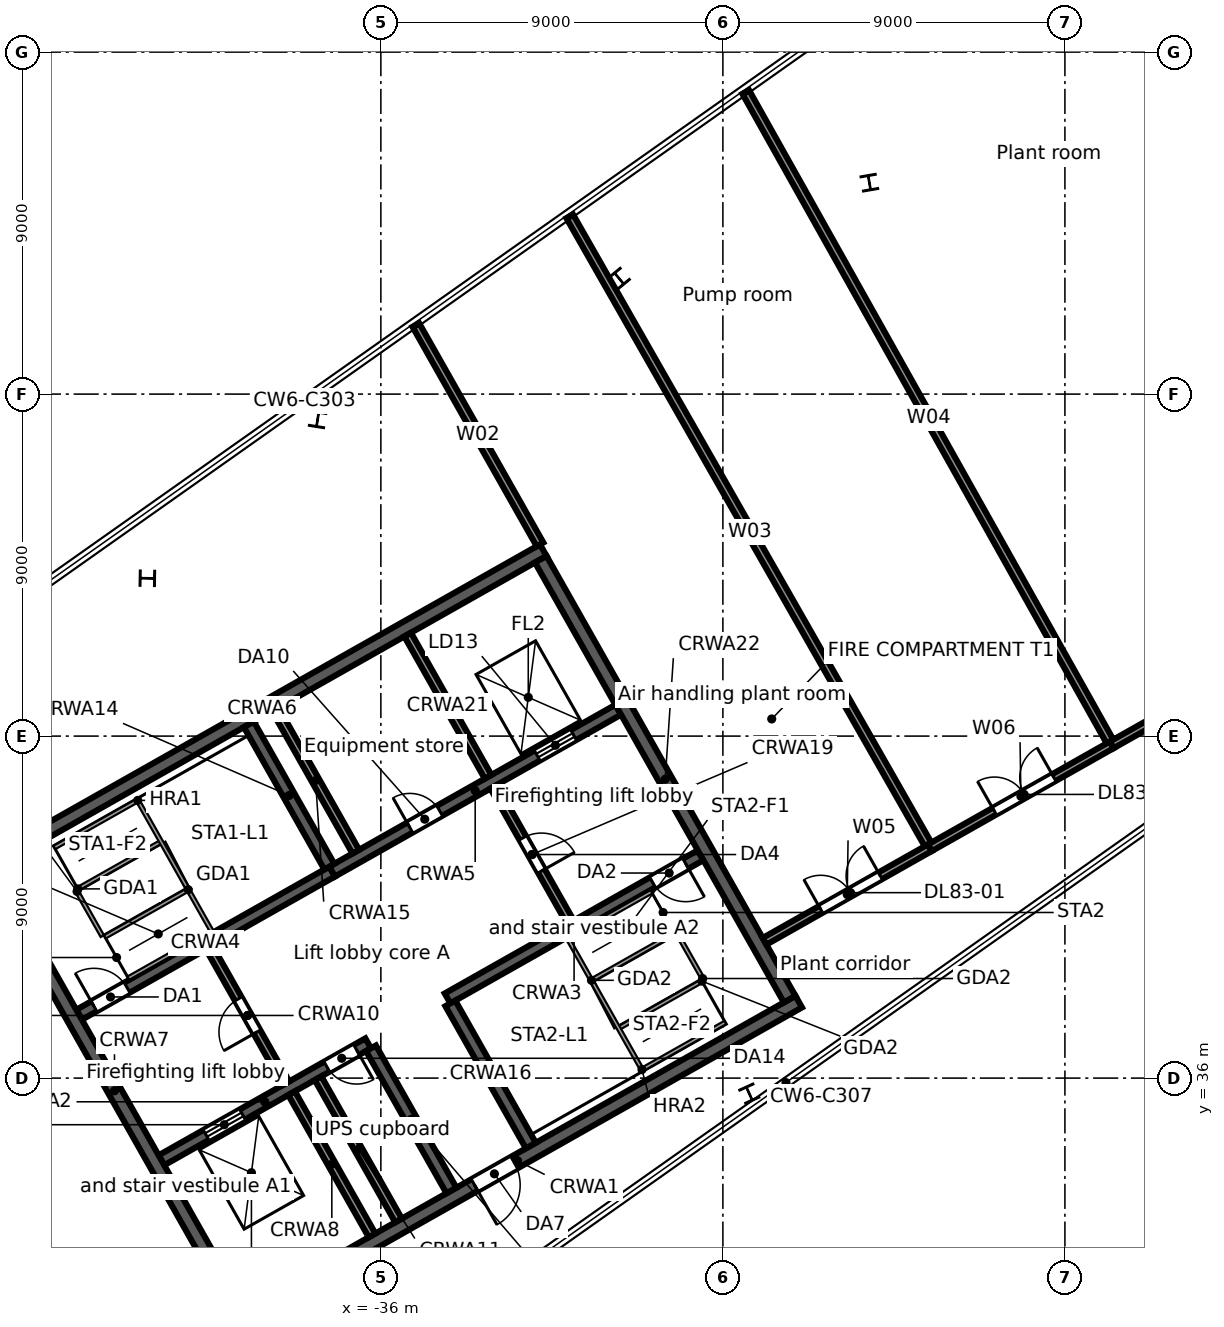
"""IFC4 building model, lengths in metres.
Left out: names, types, materials, properties, quantities, classifications, styles, units other than length and angle.
Written with IfcOpenShell. Run it as: python <this file> out.ifc"""

import sys

from ifc_helpers import new_model, si_unit, direction, frame, frame_2d, origin, origin_2d, place, context, subcontext, project, spatial, rectangle, i_section, extrude, element, fill, save


model = new_model("IFC4")
c1 = context("Model", 3, precision=1e-05, world=origin(), true_north=direction((0.0, 1.0)))
c2 = subcontext(c1, "Body", "Model", "MODEL_VIEW")
j1 = project(units=[si_unit("LENGTHUNIT", "METRE"), si_unit("PLANEANGLEUNIT", "RADIAN")], contexts=[c1])
p1 = place(None, origin())
s1 = spatial("IfcSite", under=j1, at=p1, CompositionType="ELEMENT")
p2 = place(p1, origin())
s2 = spatial("IfcBuilding", under=s1, at=p2, CompositionType="ELEMENT")
p3 = place(p2, frame((0.0, 0.0, 364.9)))
s3 = spatial("IfcBuildingStorey", under=s2, at=p3, CompositionType="ELEMENT", Elevation=364.9)
for number, where, z_axis, x_axis in (
    (1, (-42.144, 49.153, 0.0), (0.0, 0.0, 1.0), (0.018, 1.0, 0.0)),
    (2, (-23.146, 59.563, 0.0), (0.0, 0.0, 1.0), (0.985, 0.171, 0.0)),
    (3, (-29.729, 57.042, 0.0), (0.0, 0.0, 1.0), (-0.773, -0.635, 0.0)),
    (4, (-37.664, 53.334, 0.0), (0.0, 0.0, 1.0), (-0.987, 0.158, 0.0)),
    (5, (-26.305, 35.591, 0.0), (0.0, 0.0, 1.0), (0.911, 0.413, 0.0)),
):
    element("IfcColumn", number, at=place(p3, frame(where, z_axis=z_axis, x_axis=x_axis)), inside=s3, PredefinedType="COLUMN", context=c2, shape_type="SweptSolid", body=[
        extrude(i_section(OverallWidth=0.4, OverallDepth=0.4, WebThickness=0.013, FlangeThickness=0.021, FilletRadius=0.022, at=origin_2d()), origin(), (0.0, 0.0, 1.0), 3.6),
    ])
p4 = place(p3, frame((-44.119, 26.509, 0.0), z_axis=(0.0, 0.0, 1.0), x_axis=(-0.857168693653, 0.515035756644, 0.0)))
e6 = element("IfcWall", 6, at=p4, inside=s3, PredefinedType="STANDARD", context=c2, shape_type="SweptSolid", body=[
    extrude(rectangle(XDim=17.084, YDim=0.2, at=frame_2d((8.542, 0.0))), origin(), (0.0, 0.0, 1.0), 3.3),
])
p5 = place(p3, frame((-39.801, 29.64, 0.0), z_axis=(0.0, 0.0, 1.0), x_axis=(0.870359753402, 0.492416388494, 0.0)))
e7 = element("IfcWall", 7, at=p5, inside=s3, PredefinedType="SOLIDWALL", context=c2, shape_type="SweptSolid", body=[
    extrude(rectangle(XDim=17.0, YDim=0.35, at=frame_2d((8.5, 0.0))), origin(), (0.0, 0.0, 1.0), 3.3),
])
p6 = place(p5, frame((7.2, 0.0, 0.0)))
e8 = element("IfcOpeningElement", 8, at=p6, cuts=e7, PredefinedType="OPENING", context=c2, shape_type="SweptSolid", body=[
    extrude(rectangle(XDim=1.2, YDim=2.1, at=frame_2d((0.6, 1.05))), frame((0.0, 0.185, 0.0), z_axis=(0.0, -1.0, 0.0), x_axis=(1.0, 0.0, 0.0)), (0.0, 0.0, 1.0), 0.37),
])
p7 = place(p3, frame((-41.774, 33.838, 0.0), z_axis=(0.0, 0.0, 1.0), x_axis=(0.870355415866, 0.492424055132, 0.0)))
e9 = element("IfcWall", 9, at=p7, inside=s3, PredefinedType="SOLIDWALL", context=c2, shape_type="SweptSolid", body=[
    extrude(rectangle(XDim=6.25, YDim=0.3, at=frame_2d((3.125, 0.0))), origin(), (0.0, 0.0, 1.0), 3.3),
])
p8 = place(p7, frame((1.35, 0.0, 0.0)))
e10 = element("IfcOpeningElement", 10, at=p8, cuts=e9, PredefinedType="OPENING", context=c2, shape_type="SweptSolid", body=[
    extrude(rectangle(XDim=1.1, YDim=2.1, at=frame_2d((0.55, 1.05))), frame((0.0, 0.16, 0.0), z_axis=(0.0, -1.0, 0.0), x_axis=(1.0, 0.0, 0.0)), (0.0, 0.0, 1.0), 0.32),
])
p9 = place(p7, frame((5.0, 0.0, 0.0)))
e11 = element("IfcOpeningElement", 11, at=p9, cuts=e9, PredefinedType="OPENING", context=c2, shape_type="SweptSolid", body=[
    extrude(rectangle(XDim=0.9, YDim=2.1, at=frame_2d((0.45, 1.05))), frame((0.0, 0.16, 0.0), z_axis=(0.0, -1.0, 0.0), x_axis=(1.0, 0.0, 0.0)), (0.0, 0.0, 1.0), 0.32),
])
p10 = place(p3, frame((-34.245, 38.097, 0.0), z_axis=(0.0, 0.0, 1.0), x_axis=(0.870352347706, 0.49242947804, 0.0)))
e12 = element("IfcWall", 12, at=p10, inside=s3, PredefinedType="SOLIDWALL", context=c2, shape_type="SweptSolid", body=[
    extrude(rectangle(XDim=7.65, YDim=0.3, at=frame_2d((3.825, 0.0))), origin(), (0.0, 0.0, 1.0), 3.3),
])
p11 = place(p10, frame((6.2, 0.0, 0.0)))
e13 = element("IfcOpeningElement", 13, at=p11, cuts=e12, PredefinedType="OPENING", context=c2, shape_type="SweptSolid", body=[
    extrude(rectangle(XDim=1.0, YDim=2.1, at=frame_2d((0.5, 1.05))), frame((0.0, 0.16, 0.0), z_axis=(0.0, -1.0, 0.0), x_axis=(1.0, 0.0, 0.0)), (0.0, 0.0, 1.0), 0.32),
])
p12 = place(p3, frame((-43.94, 37.667, 0.0), z_axis=(0.0, 0.0, 1.0), x_axis=(0.870352347706, 0.49242947804, 0.0)))
e14 = element("IfcWall", 14, at=p12, inside=s3, PredefinedType="SOLIDWALL", context=c2, shape_type="SweptSolid", body=[
    extrude(rectangle(XDim=7.65, YDim=0.3, at=frame_2d((3.825, 0.0))), origin(), (0.0, 0.0, 1.0), 3.3),
])
p13 = place(p12, frame((0.45, 0.0, 0.0)))
e15 = element("IfcOpeningElement", 15, at=p13, cuts=e14, PredefinedType="OPENING", context=c2, shape_type="SweptSolid", body=[
    extrude(rectangle(XDim=1.0, YDim=2.1, at=frame_2d((0.5, 1.05))), frame((0.0, 0.16, 0.0), z_axis=(0.0, -1.0, 0.0), x_axis=(1.0, 0.0, 0.0)), (0.0, 0.0, 1.0), 0.32),
])
p14 = place(p3, frame((-37.282, 41.435, 0.0), z_axis=(0.0, 0.0, 1.0), x_axis=(0.870364588774, 0.492407841741, 0.0)))
e16 = element("IfcWall", 16, at=p14, inside=s3, PredefinedType="SOLIDWALL", context=c2, shape_type="SweptSolid", body=[
    extrude(rectangle(XDim=8.65, YDim=0.3, at=frame_2d((4.325, 0.0))), origin(), (0.0, 0.0, 1.0), 3.3),
])
p15 = place(p14, frame((6.2, 0.0, 0.0)))
e17 = element("IfcOpeningElement", 17, at=p15, cuts=e16, PredefinedType="OPENING", context=c2, shape_type="SweptSolid", body=[
    extrude(rectangle(XDim=1.1, YDim=2.1, at=frame_2d((0.55, 1.05))), frame((0.0, 0.16, 0.0), z_axis=(0.0, -1.0, 0.0), x_axis=(1.0, 0.0, 0.0)), (0.0, 0.0, 1.0), 0.32),
])
p16 = place(p14, frame((2.35, 0.0, 0.0)))
e18 = element("IfcOpeningElement", 18, at=p16, cuts=e16, PredefinedType="OPENING", context=c2, shape_type="SweptSolid", body=[
    extrude(rectangle(XDim=0.9, YDim=2.1, at=frame_2d((0.45, 1.05))), frame((0.0, 0.16, 0.0), z_axis=(0.0, -1.0, 0.0), x_axis=(1.0, 0.0, 0.0)), (0.0, 0.0, 1.0), 0.32),
])
p17 = place(p3, frame((-46.522, 41.521, 0.0), z_axis=(0.0, 0.0, 1.0), x_axis=(0.870359753402, 0.492416388494, 0.0)))
e19 = element("IfcWall", 19, at=p17, inside=s3, PredefinedType="SOLIDWALL", context=c2, shape_type="SweptSolid", body=[
    extrude(rectangle(XDim=17.0, YDim=0.35, at=frame_2d((8.5, 0.0))), origin(), (0.0, 0.0, 1.0), 3.3),
])
p18 = place(p3, frame((-46.284, 41.454, 0.0), z_axis=(0.0, 0.0, 1.0), x_axis=(0.492429810477, -0.870352159619, 0.0)))
e20 = element("IfcWall", 20, at=p18, inside=s3, PredefinedType="SOLIDWALL", context=c2, shape_type="SweptSolid", body=[
    extrude(rectangle(XDim=13.3, YDim=0.35, at=frame_2d((6.65, 0.0))), origin(), (0.0, 0.0, 1.0), 3.3),
])
p19 = place(p3, frame((-38.349, 35.603, 0.0), z_axis=(0.0, 0.0, 1.0), x_axis=(0.492410799949, -0.870362915164, 0.0)))
e21 = element("IfcWall", 21, at=p19, inside=s3, PredefinedType="SOLIDWALL", context=c2, shape_type="SweptSolid", body=[
    extrude(rectangle(XDim=4.3, YDim=0.2, at=frame_2d((2.15, 0.0))), origin(), (0.0, 0.0, 1.0), 3.3),
])
p20 = place(p3, frame((-40.516, 39.433, 0.0), z_axis=(0.0, 0.0, 1.0), x_axis=(0.492453559952, -0.87033872216, 0.0)))
e22 = element("IfcWall", 22, at=p20, inside=s3, PredefinedType="PARTITIONING", context=c2, shape_type="SweptSolid", body=[
    extrude(rectangle(XDim=4.1, YDim=0.2, at=frame_2d((2.05, 0.0))), origin(), (0.0, 0.0, 1.0), 3.3),
])
p21 = place(p20, frame((1.55, 0.0, 0.0)))
e23 = element("IfcOpeningElement", 23, at=p21, cuts=e22, PredefinedType="OPENING", context=c2, shape_type="SweptSolid", body=[
    extrude(rectangle(XDim=1.0, YDim=2.1, at=frame_2d((0.5, 1.05))), frame((0.0, 0.11, 0.0), z_axis=(0.0, -1.0, 0.0), x_axis=(1.0, 0.0, 0.0)), (0.0, 0.0, 1.0), 0.22),
])
p22 = place(p3, frame((-37.653, 35.997, 0.0), z_axis=(0.0, 0.0, 1.0), x_axis=(0.492435133428, -0.870349147967, 0.0)))
e24 = element("IfcWall", 24, at=p22, inside=s3, PredefinedType="SOLIDWALL", context=c2, shape_type="SweptSolid", body=[
    extrude(rectangle(XDim=4.3, YDim=0.2, at=frame_2d((2.15, 0.0))), origin(), (0.0, 0.0, 1.0), 3.3),
])
p23 = place(p3, frame((-36.26, 36.785, 0.0), z_axis=(0.0, 0.0, 1.0), x_axis=(0.492435133428, -0.870349147967, 0.0)))
e25 = element("IfcWall", 25, at=p23, inside=s3, PredefinedType="SOLIDWALL", context=c2, shape_type="SweptSolid", body=[
    extrude(rectangle(XDim=4.3, YDim=0.3, at=frame_2d((2.15, 0.0))), origin(), (0.0, 0.0, 1.0), 3.3),
])
p24 = place(p3, frame((-39.473, 45.308, 0.0), z_axis=(0.0, 0.0, 1.0), x_axis=(0.492410799949, -0.870362915164, 0.0)))
e26 = element("IfcWall", 26, at=p24, inside=s3, PredefinedType="SOLIDWALL", context=c2, shape_type="SweptSolid", body=[
    extrude(rectangle(XDim=4.3, YDim=0.3, at=frame_2d((2.15, 0.0))), origin(), (0.0, 0.0, 1.0), 3.3),
])
p25 = place(p3, frame((-38.777, 45.701, 0.0), z_axis=(0.0, 0.0, 1.0), x_axis=(0.492435133428, -0.870349147967, 0.0)))
e27 = element("IfcWall", 27, at=p25, inside=s3, PredefinedType="SOLIDWALL", context=c2, shape_type="SweptSolid", body=[
    extrude(rectangle(XDim=4.3, YDim=0.2, at=frame_2d((2.15, 0.0))), origin(), (0.0, 0.0, 1.0), 3.3),
])
p26 = place(p3, frame((-34.171, 37.967, 0.0), z_axis=(0.0, 0.0, 1.0), x_axis=(0.492435133428, -0.870349147967, 0.0)))
e28 = element("IfcWall", 28, at=p26, inside=s3, PredefinedType="SOLIDWALL", context=c2, shape_type="SweptSolid", body=[
    extrude(rectangle(XDim=4.3, YDim=0.3, at=frame_2d((2.15, 0.0))), origin(), (0.0, 0.0, 1.0), 3.3),
])
p27 = place(p3, frame((-33.031, 43.667, 0.0), z_axis=(0.0, 0.0, 1.0), x_axis=(0.492408451753, -0.87036424366, 0.0)))
e29 = element("IfcWall", 29, at=p27, inside=s3, PredefinedType="PARTITIONING", context=c2, shape_type="SweptSolid", body=[
    extrude(rectangle(XDim=4.1, YDim=0.2, at=frame_2d((2.05, 0.0))), origin(), (0.0, 0.0, 1.0), 3.3),
])
p28 = place(p27, frame((1.55, 0.0, 0.0)))
e30 = element("IfcOpeningElement", 30, at=p28, cuts=e29, PredefinedType="OPENING", context=c2, shape_type="SweptSolid", body=[
    extrude(rectangle(XDim=1.0, YDim=2.1, at=frame_2d((0.5, 1.05))), frame((0.0, 0.11, 0.0), z_axis=(0.0, -1.0, 0.0), x_axis=(1.0, 0.0, 0.0)), (0.0, 0.0, 1.0), 0.22),
])
p29 = place(p3, frame((-35.296, 47.671, 0.0), z_axis=(0.0, 0.0, 1.0), x_axis=(0.492435133428, -0.870349147967, 0.0)))
e31 = element("IfcWall", 31, at=p29, inside=s3, PredefinedType="SOLIDWALL", context=c2, shape_type="SweptSolid", body=[
    extrude(rectangle(XDim=4.3, YDim=0.2, at=frame_2d((2.15, 0.0))), origin(), (0.0, 0.0, 1.0), 3.3),
])
p30 = place(p3, frame((-31.792, 49.653, 0.0), z_axis=(0.0, 0.0, 1.0), x_axis=(0.492421943245, -0.870356610712, 0.0)))
e32 = element("IfcWall", 32, at=p30, inside=s3, PredefinedType="SOLIDWALL", context=c2, shape_type="SweptSolid", body=[
    extrude(rectangle(XDim=13.3, YDim=0.35, at=frame_2d((6.65, 0.0))), origin(), (0.0, 0.0, 1.0), 3.3),
])
p31 = place(p3, frame((-35.08, 55.819, 0.0), z_axis=(0.0, 0.0, 1.0), x_axis=(0.49249727422, -0.870313986379, 0.0)))
e33 = element("IfcWall", 33, at=p31, inside=s3, PredefinedType="PARTITIONING", context=c2, shape_type="SweptSolid", body=[
    extrude(rectangle(XDim=6.636, YDim=0.2, at=frame_2d((3.318, 0.0))), origin(), (0.0, 0.0, 1.0), 2.68),
])
p32 = place(p3, frame((-31.031, 58.679, 0.0), z_axis=(0.0, 0.0, 1.0), x_axis=(0.495492853456, -0.868612014753, 0.0)))
e34 = element("IfcWall", 34, at=p32, inside=s3, PredefinedType="PARTITIONING", context=c2, shape_type="SweptSolid", body=[
    extrude(rectangle(XDim=19.13, YDim=0.2, at=frame_2d((9.565, 0.0))), origin(), (0.0, 0.0, 1.0), 2.68),
])
p33 = place(p3, frame((-26.399, 61.95, 0.0), z_axis=(0.0, 0.0, 1.0), x_axis=(0.489116217078, -0.872218622933, 0.0)))
e35 = element("IfcWall", 35, at=p33, inside=s3, PredefinedType="PARTITIONING", context=c2, shape_type="SweptSolid", body=[
    extrude(rectangle(XDim=19.697, YDim=0.2, at=frame_2d((9.848, 0.0))), origin(), (0.0, 0.0, 1.0), 2.68),
])
p34 = place(p3, frame((-25.904, 39.6, 0.0), z_axis=(0.0, 0.0, 1.0), x_axis=(0.870386362759, 0.492369352746, 0.0)))
e36 = element("IfcWall", 36, at=p34, inside=s3, PredefinedType="PARTITIONING", context=c2, shape_type="SweptSolid", body=[
    extrude(rectangle(XDim=5.0, YDim=0.2, at=frame_2d((2.5, 0.0))), origin(), (0.0, 0.0, 1.0), 3.3),
])
p35 = place(p34, frame((1.7, 0.0, 0.0)))
e37 = element("IfcOpeningElement", 37, at=p35, cuts=e36, PredefinedType="OPENING", context=c2, shape_type="SweptSolid", body=[
    extrude(rectangle(XDim=1.8, YDim=2.1, at=frame_2d((0.9, 1.05))), frame((0.0, 0.11, 0.0), z_axis=(0.0, -1.0, 0.0), x_axis=(1.0, 0.0, 0.0)), (0.0, 0.0, 1.0), 0.22),
])
p36 = place(p3, frame((-21.552, 42.062, 0.0), z_axis=(0.0, 0.0, 1.0), x_axis=(0.870387515286, 0.492367315359, 0.0)))
e38 = element("IfcWall", 38, at=p36, inside=s3, PredefinedType="PARTITIONING", context=c2, shape_type="SweptSolid", body=[
    extrude(rectangle(XDim=5.5, YDim=0.2, at=frame_2d((2.75, 0.0))), origin(), (0.0, 0.0, 1.0), 3.3),
])
p37 = place(p36, frame((1.95, 0.0, 0.0)))
e39 = element("IfcOpeningElement", 39, at=p37, cuts=e38, PredefinedType="OPENING", context=c2, shape_type="SweptSolid", body=[
    extrude(rectangle(XDim=1.8, YDim=2.1, at=frame_2d((0.9, 1.05))), frame((0.0, 0.11, 0.0), z_axis=(0.0, -1.0, 0.0), x_axis=(1.0, 0.0, 0.0)), (0.0, 0.0, 1.0), 0.22),
])
p38 = place(p3, frame((-16.765, 44.77, 0.0), z_axis=(0.0, 0.0, 1.0), x_axis=(0.870320026037, 0.492486601116, 0.0)))
e40 = element("IfcWall", 40, at=p38, inside=s3, PredefinedType="PARTITIONING", context=c2, shape_type="SweptSolid", body=[
    extrude(rectangle(XDim=6.126, YDim=0.2, at=frame_2d((3.063, 0.0))), origin(), (0.0, 0.0, 1.0), 3.3),
])
p39 = place(p38, frame((2.2, 0.0, 0.0)))
e41 = element("IfcOpeningElement", 41, at=p39, cuts=e40, PredefinedType="OPENING", context=c2, shape_type="SweptSolid", body=[
    extrude(rectangle(XDim=1.8, YDim=2.1, at=frame_2d((0.9, 1.05))), frame((0.0, 0.11, 0.0), z_axis=(0.0, -1.0, 0.0), x_axis=(1.0, 0.0, 0.0)), (0.0, 0.0, 1.0), 0.22),
])
p40 = place(p15, origin())
e42 = element("IfcDoor", 42, at=p40, inside=s3, OperationType="DOUBLE_DOOR_SLIDING", PredefinedType="DOOR", context=c2, shape_type="SweptSolid", body=[
    extrude(rectangle(XDim=1.1, YDim=2.1, at=frame_2d((0.55, 1.05))), frame((0.0, 0.025, 0.0), z_axis=(0.0, -1.0, 0.0), x_axis=(1.0, 0.0, 0.0)), (0.0, 0.0, 1.0), 0.05),
])
fill(e17, e42)
p41 = place(p8, origin())
e43 = element("IfcDoor", 43, at=p41, inside=s3, OperationType="DOUBLE_DOOR_SLIDING", PredefinedType="DOOR", context=c2, shape_type="SweptSolid", body=[
    extrude(rectangle(XDim=1.1, YDim=2.1, at=frame_2d((0.55, 1.05))), frame((0.0, 0.025, 0.0), z_axis=(0.0, -1.0, 0.0), x_axis=(1.0, 0.0, 0.0)), (0.0, 0.0, 1.0), 0.05),
])
fill(e10, e43)
p42 = place(p13, origin())
e44 = element("IfcDoor", 44, at=p42, inside=s3, OperationType="SINGLE_SWING_LEFT", PredefinedType="DOOR", context=c2, shape_type="SweptSolid", body=[
    extrude(rectangle(XDim=1.0, YDim=2.1, at=frame_2d((0.5, 1.05))), frame((0.0, 0.025, 0.0), z_axis=(0.0, -1.0, 0.0), x_axis=(1.0, 0.0, 0.0)), (0.0, 0.0, 1.0), 0.05),
])
fill(e15, e44)
p43 = place(p11, frame((1.0, 0.0, 0.0), z_axis=(0.0, 0.0, 1.0), x_axis=(-1.0, 0.0, 0.0)))
e45 = element("IfcDoor", 45, at=p43, inside=s3, OperationType="SINGLE_SWING_LEFT", PredefinedType="DOOR", context=c2, shape_type="SweptSolid", body=[
    extrude(rectangle(XDim=1.0, YDim=2.1, at=frame_2d((0.5, 1.05))), frame((0.0, 0.025, 0.0), z_axis=(0.0, -1.0, 0.0), x_axis=(1.0, 0.0, 0.0)), (0.0, 0.0, 1.0), 0.05),
])
fill(e13, e45)
p44 = place(p21, frame((1.0, 0.0, 0.0), z_axis=(0.0, 0.0, 1.0), x_axis=(-1.0, 0.0, 0.0)))
e46 = element("IfcDoor", 46, at=p44, inside=s3, OperationType="SINGLE_SWING_LEFT", PredefinedType="DOOR", context=c2, shape_type="SweptSolid", body=[
    extrude(rectangle(XDim=1.0, YDim=2.1, at=frame_2d((0.5, 1.05))), frame((0.0, 0.025, 0.0), z_axis=(0.0, -1.0, 0.0), x_axis=(1.0, 0.0, 0.0)), (0.0, 0.0, 1.0), 0.05),
])
fill(e23, e46)
p45 = place(p28, origin())
e47 = element("IfcDoor", 47, at=p45, inside=s3, OperationType="SINGLE_SWING_RIGHT", PredefinedType="DOOR", context=c2, shape_type="SweptSolid", body=[
    extrude(rectangle(XDim=1.0, YDim=2.1, at=frame_2d((0.5, 1.05))), frame((0.0, 0.025, 0.0), z_axis=(0.0, -1.0, 0.0), x_axis=(1.0, 0.0, 0.0)), (0.0, 0.0, 1.0), 0.05),
])
fill(e30, e47)
p46 = place(p6, frame((1.2, 0.0, 0.0), z_axis=(0.0, 0.0, 1.0), x_axis=(-1.0, 0.0, 0.0)))
e48 = element("IfcDoor", 48, at=p46, inside=s3, OperationType="SINGLE_SWING_RIGHT", PredefinedType="DOOR", context=c2, shape_type="SweptSolid", body=[
    extrude(rectangle(XDim=1.2, YDim=2.1, at=frame_2d((0.6, 1.05))), frame((0.0, 0.025, 0.0), z_axis=(0.0, -1.0, 0.0), x_axis=(1.0, 0.0, 0.0)), (0.0, 0.0, 1.0), 0.05),
])
fill(e8, e48)
p47 = place(p16, origin())
e49 = element("IfcDoor", 49, at=p47, inside=s3, OperationType="SINGLE_SWING_LEFT", PredefinedType="DOOR", context=c2, shape_type="SweptSolid", body=[
    extrude(rectangle(XDim=0.9, YDim=2.1, at=frame_2d((0.45, 1.05))), frame((0.0, 0.025, 0.0), z_axis=(0.0, -1.0, 0.0), x_axis=(1.0, 0.0, 0.0)), (0.0, 0.0, 1.0), 0.05),
])
fill(e18, e49)
p48 = place(p9, frame((0.9, 0.0, 0.0), z_axis=(0.0, 0.0, 1.0), x_axis=(-1.0, 0.0, 0.0)))
e50 = element("IfcDoor", 50, at=p48, inside=s3, OperationType="SINGLE_SWING_LEFT", PredefinedType="DOOR", context=c2, shape_type="SweptSolid", body=[
    extrude(rectangle(XDim=0.9, YDim=2.1, at=frame_2d((0.45, 1.05))), frame((0.0, 0.025, 0.0), z_axis=(0.0, -1.0, 0.0), x_axis=(1.0, 0.0, 0.0)), (0.0, 0.0, 1.0), 0.05),
])
fill(e11, e50)
p49 = place(p35, origin())
e51 = element("IfcDoor", 51, at=p49, inside=s3, OperationType="DOUBLE_DOOR_SINGLE_SWING", PredefinedType="DOOR", context=c2, shape_type="SweptSolid", body=[
    extrude(rectangle(XDim=1.8, YDim=2.1, at=frame_2d((0.9, 1.05))), frame((0.0, 0.025, 0.0), z_axis=(0.0, -1.0, 0.0), x_axis=(1.0, 0.0, 0.0)), (0.0, 0.0, 1.0), 0.05),
])
fill(e37, e51)
p50 = place(p37, origin())
e52 = element("IfcDoor", 52, at=p50, inside=s3, OperationType="DOUBLE_DOOR_SINGLE_SWING", PredefinedType="DOOR", context=c2, shape_type="SweptSolid", body=[
    extrude(rectangle(XDim=1.8, YDim=2.1, at=frame_2d((0.9, 1.05))), frame((0.0, 0.025, 0.0), z_axis=(0.0, -1.0, 0.0), x_axis=(1.0, 0.0, 0.0)), (0.0, 0.0, 1.0), 0.05),
])
fill(e39, e52)
save(model, sys.argv[1])
